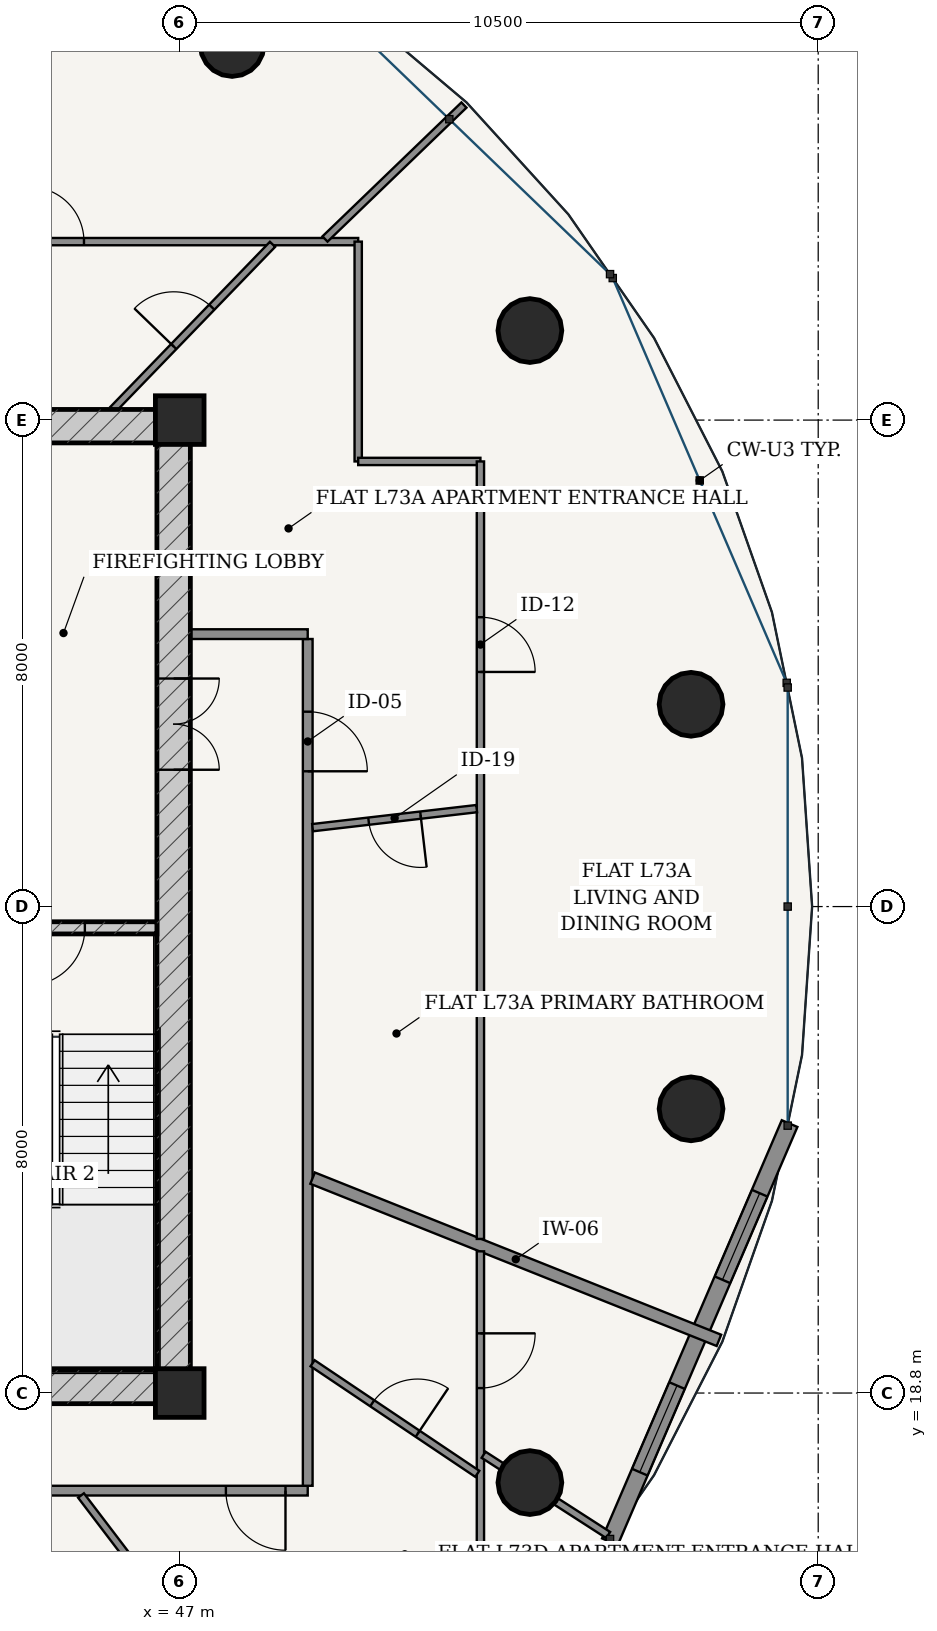
"""IFC4 building model, lengths in metres.
Left out: names, types, materials, properties, quantities, classifications, styles, units other than length and angle.
Written with IfcOpenShell. Run it as: python <this file> out.ifc"""

import sys

from ifc_helpers import new_model, si_unit, direction, frame, frame_2d, origin, origin_2d, place, context, subcontext, project, spatial, rectangle, hollow_circle, extrude, source, transform, mapped, element, fill, save


model = new_model("IFC4")
c1 = context("Model", 3, precision=1e-05, world=origin(), true_north=direction((-0.2419218956, 0.970295726276)))
c2 = subcontext(c1, "Body", "Model", "MODEL_VIEW")
j1 = project(units=[si_unit("LENGTHUNIT", "METRE"), si_unit("PLANEANGLEUNIT", "RADIAN")], contexts=[c1])
p1 = place(None, origin())
s1 = spatial("IfcSite", under=j1, at=p1, CompositionType="ELEMENT")
p2 = place(p1, origin())
s2 = spatial("IfcBuilding", under=s1, at=p2, CompositionType="ELEMENT")
p3 = place(p2, frame((0.0, 0.0, 278.2)))
s3 = spatial("IfcBuildingStorey", under=s2, at=p3, CompositionType="ELEMENT", Elevation=278.2)
for number, where, z_axis, x_axis in (
    (1, (47.0, 18.8, 0.0), (0.0, 0.0, 1.0), (1.0, 0.0, 0.0)),
    (2, (47.0, 34.8, 0.0), (0.0, 0.0, 1.0), (1.0, 0.0, 0.0)),
):
    element("IfcColumn", number, at=place(p3, frame(where, z_axis=z_axis, x_axis=x_axis)), inside=s3, PredefinedType="COLUMN", context=c2, shape_type="SweptSolid", body=[
        extrude(rectangle(XDim=0.8, YDim=0.8, at=origin_2d()), origin(), (0.0, 0.0, 1.0), 3.75),
    ])
p4 = place(p3, frame((28.825, 18.9, 0.0), z_axis=(0.0, 0.0, 1.0), x_axis=(1.0, 0.0, 0.0)))
e3 = element("IfcWall", 3, at=p4, inside=s3, PredefinedType="SHEAR", context=c2, shape_type="SweptSolid", body=[
    extrude(rectangle(XDim=18.35, YDim=0.55, at=frame_2d((9.175, 0.0))), origin(), (0.0, 0.0, 1.0), 3.49),
])
p5 = place(p4, frame((6.71, 0.0, 0.0)))
e4 = element("IfcOpeningElement", 4, at=p5, cuts=e3, PredefinedType="OPENING", context=c2, shape_type="SweptSolid", body=[
    extrude(rectangle(XDim=0.85, YDim=2.1, at=frame_2d((0.425, 1.05))), frame((0.0, 0.285, 0.0), z_axis=(0.0, -1.0, 0.0), x_axis=(1.0, 0.0, 0.0)), (0.0, 0.0, 1.0), 0.57),
])
p6 = place(p4, frame((8.75, 0.0, 0.0)))
e5 = element("IfcOpeningElement", 5, at=p6, cuts=e3, PredefinedType="OPENING", context=c2, shape_type="SweptSolid", body=[
    extrude(rectangle(XDim=0.85, YDim=2.1, at=frame_2d((0.425, 1.05))), frame((0.0, 0.285, 0.0), z_axis=(0.0, -1.0, 0.0), x_axis=(1.0, 0.0, 0.0)), (0.0, 0.0, 1.0), 0.57),
])
p7 = place(p4, frame((10.79, 0.0, 0.0)))
e6 = element("IfcOpeningElement", 6, at=p7, cuts=e3, PredefinedType="OPENING", context=c2, shape_type="SweptSolid", body=[
    extrude(rectangle(XDim=0.85, YDim=2.1, at=frame_2d((0.425, 1.05))), frame((0.0, 0.285, 0.0), z_axis=(0.0, -1.0, 0.0), x_axis=(1.0, 0.0, 0.0)), (0.0, 0.0, 1.0), 0.57),
])
p8 = place(p3, frame((28.825, 34.7, 0.0), z_axis=(0.0, 0.0, 1.0), x_axis=(1.0, 0.0, 0.0)))
e7 = element("IfcWall", 7, at=p8, inside=s3, PredefinedType="SHEAR", context=c2, shape_type="SweptSolid", body=[
    extrude(rectangle(XDim=18.35, YDim=0.55, at=frame_2d((9.175, 0.0))), origin(), (0.0, 0.0, 1.0), 3.49),
])
p9 = place(p3, frame((46.9, 19.175, 0.0), z_axis=(0.0, 0.0, 1.0), x_axis=(0.0, 1.0, 0.0)))
e8 = element("IfcWall", 8, at=p9, inside=s3, PredefinedType="SHEAR", context=c2, shape_type="SweptSolid", body=[
    extrude(rectangle(XDim=15.25, YDim=0.55, at=frame_2d((7.625, 0.0))), origin(), (0.0, 0.0, 1.0), 3.49),
])
p10 = place(p9, frame((9.875, 0.0, 0.0)))
e9 = element("IfcOpeningElement", 9, at=p10, cuts=e8, PredefinedType="OPENING", context=c2, shape_type="SweptSolid", body=[
    extrude(rectangle(XDim=1.5, YDim=2.2, at=frame_2d((0.75, 1.1))), frame((0.0, 0.285, 0.0), z_axis=(0.0, -1.0, 0.0), x_axis=(1.0, 0.0, 0.0)), (0.0, 0.0, 1.0), 0.57),
])
p11 = place(p3, frame((43.305, 26.45, 0.0), z_axis=(0.0, 0.0, 1.0), x_axis=(1.0, 0.0, 0.0)))
e10 = element("IfcWall", 10, at=p11, inside=s3, PredefinedType="SOLIDWALL", context=c2, shape_type="SweptSolid", body=[
    extrude(rectangle(XDim=3.32, YDim=0.2, at=frame_2d((1.66, 0.0))), origin(), (0.0, 0.0, 1.0), 3.49),
])
p12 = place(p11, frame((1.185, 0.0, 0.0)))
e11 = element("IfcOpeningElement", 11, at=p12, cuts=e10, PredefinedType="OPENING", context=c2, shape_type="SweptSolid", body=[
    extrude(rectangle(XDim=0.95, YDim=2.15, at=frame_2d((0.475, 1.075))), frame((0.0, 0.11, 0.0), z_axis=(0.0, -1.0, 0.0), x_axis=(1.0, 0.0, 0.0)), (0.0, 0.0, 1.0), 0.22),
])
for number, where, z_axis, x_axis in (
    (12, (55.409, 30.126, 0.0), (0.0, 0.0, 1.0), (1.0, 0.0, 0.0)),
    (13, (52.759, 36.272, 0.0), (0.0, 0.0, 1.0), (1.0, 0.0, 0.0)),
    (14, (47.861, 40.977, 0.0), (0.0, 0.0, 1.0), (1.0, 0.0, 0.0)),
    (15, (52.759, 17.328, 0.0), (0.0, 0.0, 1.0), (1.0, 0.0, 0.0)),
    (16, (55.409, 23.474, 0.0), (0.0, 0.0, 1.0), (1.0, 0.0, 0.0)),
):
    element("IfcColumn", number, at=place(p3, frame(where, z_axis=z_axis, x_axis=x_axis)), inside=s3, PredefinedType="COLUMN", context=c2, shape_type="SweptSolid", body=[
        extrude(hollow_circle(Radius=0.525, WallThickness=0.035, at=origin_2d()), origin(), (0.0, 0.0, 1.0), 3.75),
    ])
p13 = place(p3, frame((54.074, 16.354, 0.0), z_axis=(0.0, 0.0, 1.0), x_axis=(0.394816612978, 0.918759948037, 0.0)))
e17 = element("IfcWall", 17, at=p13, inside=s3, PredefinedType="SOLIDWALL", context=c2, shape_type="SweptSolid", body=[
    extrude(rectangle(XDim=7.485, YDim=0.28, at=frame_2d((3.743, 0.0))), origin(), (0.0, 0.0, 1.0), 3.49),
])
p14 = place(p13, frame((1.246, 0.0, 0.85)))
e18 = element("IfcOpeningElement", 18, at=p14, cuts=e17, PredefinedType="OPENING", context=c2, shape_type="SweptSolid", body=[
    extrude(rectangle(XDim=1.55, YDim=1.95, at=frame_2d((0.775, 0.975))), frame((0.0, 0.15, 0.0), z_axis=(0.0, -1.0, 0.0), x_axis=(1.0, 0.0, 0.0)), (0.0, 0.0, 1.0), 0.3),
])
p15 = place(p13, frame((4.689, 0.0, 0.85)))
e19 = element("IfcOpeningElement", 19, at=p15, cuts=e17, PredefinedType="OPENING", context=c2, shape_type="SweptSolid", body=[
    extrude(rectangle(XDim=1.55, YDim=1.95, at=frame_2d((0.775, 0.975))), frame((0.0, 0.15, 0.0), z_axis=(0.0, -1.0, 0.0), x_axis=(1.0, 0.0, 0.0)), (0.0, 0.0, 1.0), 0.3),
])
p16 = place(p3, frame((26.895, 17.195, 0.0), z_axis=(0.0, 0.0, 1.0), x_axis=(1.0, 0.0, 0.0)))
e20 = element("IfcWall", 20, at=p16, inside=s3, PredefinedType="PARTITIONING", context=c2, shape_type="SweptSolid", body=[
    extrude(rectangle(XDim=22.21, YDim=0.16, at=frame_2d((11.105, 0.0))), origin(), (0.0, 0.0, 1.0), 3.015),
])
p17 = place(p16, frame((9.746, 0.0, 0.0)))
e21 = element("IfcOpeningElement", 21, at=p17, cuts=e20, PredefinedType="OPENING", context=c2, shape_type="SweptSolid", body=[
    extrude(rectangle(XDim=0.98, YDim=2.2, at=frame_2d((0.49, 1.1))), frame((0.0, 0.09, 0.0), z_axis=(0.0, -1.0, 0.0), x_axis=(1.0, 0.0, 0.0)), (0.0, 0.0, 1.0), 0.18),
])
p18 = place(p16, frame((20.864, 0.0, 0.0)))
e22 = element("IfcOpeningElement", 22, at=p18, cuts=e20, PredefinedType="OPENING", context=c2, shape_type="SweptSolid", body=[
    extrude(rectangle(XDim=0.98, YDim=2.2, at=frame_2d((0.49, 1.1))), frame((0.0, 0.09, 0.0), z_axis=(0.0, -1.0, 0.0), x_axis=(1.0, 0.0, 0.0)), (0.0, 0.0, 1.0), 0.18),
])
p19 = place(p3, frame((49.105, 17.275, 0.0), z_axis=(0.0, 0.0, 1.0), x_axis=(0.0, 1.0, 0.0)))
e23 = element("IfcWall", 23, at=p19, inside=s3, PredefinedType="PARTITIONING", context=c2, shape_type="SweptSolid", body=[
    extrude(rectangle(XDim=13.925, YDim=0.16, at=frame_2d((6.962, 0.0))), origin(), (0.0, 0.0, 1.0), 3.015),
])
p20 = place(p19, frame((11.75, 0.0, 0.0)))
e24 = element("IfcOpeningElement", 24, at=p20, cuts=e23, PredefinedType="OPENING", context=c2, shape_type="SweptSolid", body=[
    extrude(rectangle(XDim=0.98, YDim=2.2, at=frame_2d((0.49, 1.1))), frame((0.0, 0.09, 0.0), z_axis=(0.0, -1.0, 0.0), x_axis=(1.0, 0.0, 0.0)), (0.0, 0.0, 1.0), 0.18),
])
p21 = place(p3, frame((47.175, 31.28, 0.0), z_axis=(0.0, 0.0, 1.0), x_axis=(1.0, 0.0, 0.0)))
e25 = element("IfcWall", 25, at=p21, inside=s3, PredefinedType="PARTITIONING", context=c2, shape_type="SweptSolid", body=[
    extrude(rectangle(XDim=1.93, YDim=0.16, at=frame_2d((0.965, 0.0))), origin(), (0.0, 0.0, 1.0), 3.49),
])
p22 = place(p3, frame((49.185, 22.334, 0.0), z_axis=(0.0, 0.0, 1.0), x_axis=(0.928710518269, -0.370805573389, 0.0)))
e26 = element("IfcWall", 26, at=p22, inside=s3, PredefinedType="PARTITIONING", context=c2, shape_type="SweptSolid", body=[
    extrude(rectangle(XDim=7.195, YDim=0.2, at=frame_2d((3.598, 0.0))), origin(), (0.0, 0.0, 1.0), 3.121),
])
p23 = place(p3, frame((26.065, 37.735, 0.0), z_axis=(0.0, 0.0, 1.0), x_axis=(1.0, 0.0, 0.0)))
e27 = element("IfcWall", 27, at=p23, inside=s3, PredefinedType="PARTITIONING", context=c2, shape_type="SweptSolid", body=[
    extrude(rectangle(XDim=23.87, YDim=0.12, at=frame_2d((11.935, 0.0))), origin(), (0.0, 0.0, 1.0), 3.015),
])
p24 = place(p23, frame((18.46, 0.0, 0.0)))
e28 = element("IfcOpeningElement", 28, at=p24, cuts=e27, PredefinedType="OPENING", context=c2, shape_type="SweptSolid", body=[
    extrude(rectangle(XDim=0.9, YDim=2.15, at=frame_2d((0.45, 1.075))), frame((0.0, 0.07, 0.0), z_axis=(0.0, -1.0, 0.0), x_axis=(1.0, 0.0, 0.0)), (0.0, 0.0, 1.0), 0.14),
])
p25 = place(p23, frame((3.144, 0.0, 0.0)))
e29 = element("IfcOpeningElement", 29, at=p25, cuts=e27, PredefinedType="OPENING", context=c2, shape_type="SweptSolid", body=[
    extrude(rectangle(XDim=0.9, YDim=2.15, at=frame_2d((0.45, 1.075))), frame((0.0, 0.07, 0.0), z_axis=(0.0, -1.0, 0.0), x_axis=(1.0, 0.0, 0.0)), (0.0, 0.0, 1.0), 0.14),
])
p26 = place(p3, frame((49.935, 37.735, 0.0), z_axis=(0.0, 0.0, 1.0), x_axis=(0.0, -1.0, 0.0)))
e30 = element("IfcWall", 30, at=p26, inside=s3, PredefinedType="PARTITIONING", context=c2, shape_type="SweptSolid", body=[
    extrude(rectangle(XDim=3.615, YDim=0.12, at=frame_2d((1.808, 0.0))), origin(), (0.0, 0.0, 1.0), 3.015),
])
p27 = place(p3, frame((49.935, 34.12, 0.0), z_axis=(0.0, 0.0, 1.0), x_axis=(1.0, 0.0, 0.0)))
e31 = element("IfcWall", 31, at=p27, inside=s3, PredefinedType="PARTITIONING", context=c2, shape_type="SweptSolid", body=[
    extrude(rectangle(XDim=2.01, YDim=0.12, at=frame_2d((1.005, 0.0))), origin(), (0.0, 0.0, 1.0), 3.209),
])
p28 = place(p3, frame((51.945, 34.12, 0.0), z_axis=(0.0, 0.0, 1.0), x_axis=(0.0, -1.0, 0.0)))
e32 = element("IfcWall", 32, at=p28, inside=s3, PredefinedType="PARTITIONING", context=c2, shape_type="SweptSolid", body=[
    extrude(rectangle(XDim=12.786, YDim=0.12, at=frame_2d((6.393, 0.0))), origin(), (0.0, 0.0, 1.0), 3.015),
])
p29 = place(p28, frame((2.562, 0.0, 0.0)))
e33 = element("IfcOpeningElement", 33, at=p29, cuts=e32, PredefinedType="OPENING", context=c2, shape_type="SweptSolid", body=[
    extrude(rectangle(XDim=0.9, YDim=2.15, at=frame_2d((0.45, 1.075))), frame((0.0, 0.07, 0.0), z_axis=(0.0, -1.0, 0.0), x_axis=(1.0, 0.0, 0.0)), (0.0, 0.0, 1.0), 0.14),
])
p30 = place(p3, frame((49.389, 37.778, 0.0), z_axis=(0.0, 0.0, 1.0), x_axis=(0.719985652574, 0.693988948102, 0.0)))
e34 = element("IfcWall", 34, at=p30, inside=s3, PredefinedType="PARTITIONING", context=c2, shape_type="SweptSolid", body=[
    extrude(rectangle(XDim=3.174, YDim=0.12, at=frame_2d((1.587, 0.0))), origin(), (0.0, 0.0, 1.0), 3.121),
])
p31 = place(p3, frame((49.185, 28.098, 0.0), z_axis=(0.0, 0.0, 1.0), x_axis=(0.993339475655, 0.115224503057, 0.0)))
e35 = element("IfcWall", 35, at=p31, inside=s3, PredefinedType="PARTITIONING", context=c2, shape_type="SweptSolid", body=[
    extrude(rectangle(XDim=2.716, YDim=0.12, at=frame_2d((1.358, 0.0))), origin(), (0.0, 0.0, 1.0), 3.209),
])
p32 = place(p31, frame((0.928, 0.0, 0.0)))
e36 = element("IfcOpeningElement", 36, at=p32, cuts=e35, PredefinedType="OPENING", context=c2, shape_type="SweptSolid", body=[
    extrude(rectangle(XDim=0.86, YDim=2.15, at=frame_2d((0.43, 1.075))), frame((0.0, 0.07, 0.0), z_axis=(0.0, -1.0, 0.0), x_axis=(1.0, 0.0, 0.0)), (0.0, 0.0, 1.0), 0.14),
])
p33 = place(p3, frame((45.903, 34.976, 0.0), z_axis=(0.0, 0.0, 1.0), x_axis=(0.69497417129, 0.719034700999, 0.0)))
e37 = element("IfcWall", 37, at=p33, inside=s3, PredefinedType="PARTITIONING", context=c2, shape_type="SweptSolid", body=[
    extrude(rectangle(XDim=3.775, YDim=0.12, at=frame_2d((1.887, 0.0))), origin(), (0.0, 0.0, 1.0), 3.015),
])
p34 = place(p33, frame((1.437, 0.0, 0.0)))
e38 = element("IfcOpeningElement", 38, at=p34, cuts=e37, PredefinedType="OPENING", context=c2, shape_type="SweptSolid", body=[
    extrude(rectangle(XDim=0.9, YDim=2.15, at=frame_2d((0.45, 1.075))), frame((0.0, 0.07, 0.0), z_axis=(0.0, -1.0, 0.0), x_axis=(1.0, 0.0, 0.0)), (0.0, 0.0, 1.0), 0.14),
])
p35 = place(p3, frame((42.162, 17.115, 0.0), z_axis=(0.0, 0.0, 1.0), x_axis=(0.394795631127, -0.918768964236, 0.0)))
e39 = element("IfcWall", 39, at=p35, inside=s3, PredefinedType="PARTITIONING", context=c2, shape_type="SweptSolid", body=[
    extrude(rectangle(XDim=8.202, YDim=0.2, at=frame_2d((4.101, 0.0))), origin(), (0.0, 0.0, 1.0), 3.121),
])
p36 = place(p3, frame((51.945, 21.13, 0.0), z_axis=(0.0, 0.0, 1.0), x_axis=(0.0, -1.0, 0.0)))
e40 = element("IfcWall", 40, at=p36, inside=s3, PredefinedType="PARTITIONING", context=c2, shape_type="SweptSolid", body=[
    extrude(rectangle(XDim=6.775, YDim=0.12, at=frame_2d((3.388, 0.0))), origin(), (0.0, 0.0, 1.0), 3.015),
])
p37 = place(p36, frame((1.349, 0.0, 0.0)))
e41 = element("IfcOpeningElement", 41, at=p37, cuts=e40, PredefinedType="OPENING", context=c2, shape_type="SweptSolid", body=[
    extrude(rectangle(XDim=0.9, YDim=2.15, at=frame_2d((0.45, 1.075))), frame((0.0, 0.07, 0.0), z_axis=(0.0, -1.0, 0.0), x_axis=(1.0, 0.0, 0.0)), (0.0, 0.0, 1.0), 0.14),
])
p38 = place(p3, frame((51.997, 17.785, 0.0), z_axis=(0.0, 0.0, 1.0), x_axis=(0.840715962824, -0.541476379774, 0.0)))
e42 = element("IfcWall", 42, at=p38, inside=s3, PredefinedType="PARTITIONING", context=c2, shape_type="SweptSolid", body=[
    extrude(rectangle(XDim=2.437, YDim=0.12, at=frame_2d((1.219, 0.0))), origin(), (0.0, 0.0, 1.0), 3.015),
])
p39 = place(p3, frame((45.377, 17.115, 0.0), z_axis=(0.0, 0.0, 1.0), x_axis=(0.60588776962, -0.795550130806, 0.0)))
e43 = element("IfcWall", 43, at=p39, inside=s3, PredefinedType="PARTITIONING", context=c2, shape_type="SweptSolid", body=[
    extrude(rectangle(XDim=3.407, YDim=0.12, at=frame_2d((1.704, 0.0))), origin(), (0.0, 0.0, 1.0), 3.209),
])
p40 = place(p39, frame((1.274, 0.0, 0.0)))
e44 = element("IfcOpeningElement", 44, at=p40, cuts=e43, PredefinedType="OPENING", context=c2, shape_type="SweptSolid", body=[
    extrude(rectangle(XDim=0.86, YDim=2.15, at=frame_2d((0.43, 1.075))), frame((0.0, 0.07, 0.0), z_axis=(0.0, -1.0, 0.0), x_axis=(1.0, 0.0, 0.0)), (0.0, 0.0, 1.0), 0.14),
])
p41 = place(p3, frame((49.185, 19.29, 0.0), z_axis=(0.0, 0.0, 1.0), x_axis=(0.830215193761, -0.557443030316, 0.0)))
e45 = element("IfcWall", 45, at=p41, inside=s3, PredefinedType="PARTITIONING", context=c2, shape_type="SweptSolid", body=[
    extrude(rectangle(XDim=3.262, YDim=0.12, at=frame_2d((1.631, 0.0))), origin(), (0.0, 0.0, 1.0), 3.209),
])
p42 = place(p41, frame((1.181, 0.0, 0.0)))
e46 = element("IfcOpeningElement", 46, at=p42, cuts=e45, PredefinedType="OPENING", context=c2, shape_type="SweptSolid", body=[
    extrude(rectangle(XDim=0.9, YDim=2.15, at=frame_2d((0.45, 1.075))), frame((0.0, 0.07, 0.0), z_axis=(0.0, -1.0, 0.0), x_axis=(1.0, 0.0, 0.0)), (0.0, 0.0, 1.0), 0.14),
])
m1 = source(origin(), c2, "Body", "SweptSolid", [
    extrude(rectangle(XDim=1.55, YDim=1.95, at=frame_2d((0.775, 0.975))), frame((0.0, 0.03, 0.0), z_axis=(0.0, -1.0, 0.0), x_axis=(1.0, 0.0, 0.0)), (0.0, 0.0, 1.0), 0.06),
])
p43 = place(p14, origin())
e47 = element("IfcWindow", 47, at=p43, inside=s3, PartitioningType="SINGLE_PANEL", PredefinedType="WINDOW", context=c2, shape_type="MappedRepresentation", body=[
    mapped(m1, transform((0.0, 0.0, 0.0), scale=1.0)),
])
fill(e18, e47)
p44 = place(p15, origin())
e48 = element("IfcWindow", 48, at=p44, inside=s3, PartitioningType="SINGLE_PANEL", PredefinedType="WINDOW", context=c2, shape_type="MappedRepresentation", body=[
    mapped(m1, transform((0.0, 0.0, 0.0), scale=1.0)),
])
fill(e19, e48)
m2 = source(origin(), c2, "Body", "SweptSolid", [
    extrude(rectangle(XDim=1.5, YDim=2.2, at=frame_2d((0.75, 1.1))), frame((0.0, 0.025, 0.0), z_axis=(0.0, -1.0, 0.0), x_axis=(1.0, 0.0, 0.0)), (0.0, 0.0, 1.0), 0.05),
])
p45 = place(p10, frame((1.5, 0.0, 0.0), z_axis=(0.0, 0.0, 1.0), x_axis=(-1.0, 0.0, 0.0)))
e49 = element("IfcDoor", 49, at=p45, inside=s3, OperationType="DOUBLE_DOOR_SINGLE_SWING", PredefinedType="DOOR", context=c2, shape_type="MappedRepresentation", body=[
    mapped(m2, transform((0.0, 0.0, 0.0), scale=1.0)),
])
fill(e9, e49)
m3 = source(origin(), c2, "Body", "SweptSolid", [
    extrude(rectangle(XDim=0.95, YDim=2.15, at=frame_2d((0.475, 1.075))), frame((0.0, 0.025, 0.0), z_axis=(0.0, -1.0, 0.0), x_axis=(1.0, 0.0, 0.0)), (0.0, 0.0, 1.0), 0.05),
])
p46 = place(p12, frame((0.95, 0.0, 0.0), z_axis=(0.0, 0.0, 1.0), x_axis=(-1.0, 0.0, 0.0)))
e50 = element("IfcDoor", 50, at=p46, inside=s3, OperationType="SINGLE_SWING_RIGHT", PredefinedType="DOOR", context=c2, shape_type="MappedRepresentation", body=[
    mapped(m3, transform((0.0, 0.0, 0.0), scale=1.0)),
])
fill(e11, e50)
m4 = source(origin(), c2, "Body", "SweptSolid", [
    extrude(rectangle(XDim=0.98, YDim=2.2, at=frame_2d((0.49, 1.1))), frame((0.0, 0.025, 0.0), z_axis=(0.0, -1.0, 0.0), x_axis=(1.0, 0.0, 0.0)), (0.0, 0.0, 1.0), 0.05),
])
p47 = place(p20, frame((0.98, 0.0, 0.0), z_axis=(0.0, 0.0, 1.0), x_axis=(-1.0, 0.0, 0.0)))
e51 = element("IfcDoor", 51, at=p47, inside=s3, OperationType="SINGLE_SWING_RIGHT", PredefinedType="DOOR", context=c2, shape_type="MappedRepresentation", body=[
    mapped(m4, transform((0.0, 0.0, 0.0), scale=1.0)),
])
fill(e24, e51)
m5 = source(origin(), c2, "Body", "SweptSolid", [
    extrude(rectangle(XDim=0.86, YDim=2.15, at=frame_2d((0.43, 1.075))), frame((0.0, 0.025, 0.0), z_axis=(0.0, -1.0, 0.0), x_axis=(1.0, 0.0, 0.0)), (0.0, 0.0, 1.0), 0.05),
])
p48 = place(p32, frame((0.86, 0.0, 0.0), z_axis=(0.0, 0.0, 1.0), x_axis=(-1.0, 0.0, 0.0)))
e52 = element("IfcDoor", 52, at=p48, inside=s3, OperationType="SINGLE_SWING_LEFT", PredefinedType="DOOR", context=c2, shape_type="MappedRepresentation", body=[
    mapped(m5, transform((0.0, 0.0, 0.0), scale=1.0)),
])
fill(e36, e52)
m6 = source(origin(), c2, "Body", "SweptSolid", [
    extrude(rectangle(XDim=0.9, YDim=2.15, at=frame_2d((0.45, 1.075))), frame((0.0, 0.025, 0.0), z_axis=(0.0, -1.0, 0.0), x_axis=(1.0, 0.0, 0.0)), (0.0, 0.0, 1.0), 0.05),
])
p49 = place(p29, origin())
e53 = element("IfcDoor", 53, at=p49, inside=s3, OperationType="SINGLE_SWING_RIGHT", PredefinedType="DOOR", context=c2, shape_type="MappedRepresentation", body=[
    mapped(m6, transform((0.0, 0.0, 0.0), scale=1.0)),
])
fill(e33, e53)
p50 = place(p34, origin())
e54 = element("IfcDoor", 54, at=p50, inside=s3, OperationType="SINGLE_SWING_LEFT", PredefinedType="DOOR", context=c2, shape_type="MappedRepresentation", body=[
    mapped(m6, transform((0.0, 0.0, 0.0), scale=1.0)),
])
fill(e38, e54)
p51 = place(p24, origin())
e55 = element("IfcDoor", 55, at=p51, inside=s3, OperationType="SINGLE_SWING_LEFT", PredefinedType="DOOR", context=c2, shape_type="MappedRepresentation", body=[
    mapped(m6, transform((0.0, 0.0, 0.0), scale=1.0)),
])
fill(e28, e55)
p52 = place(p18, frame((0.98, 0.0, 0.0), z_axis=(0.0, 0.0, 1.0), x_axis=(-1.0, 0.0, 0.0)))
e56 = element("IfcDoor", 56, at=p52, inside=s3, OperationType="SINGLE_SWING_LEFT", PredefinedType="DOOR", context=c2, shape_type="MappedRepresentation", body=[
    mapped(m4, transform((0.0, 0.0, 0.0), scale=1.0)),
])
fill(e22, e56)
p53 = place(p42, origin())
e57 = element("IfcDoor", 57, at=p53, inside=s3, OperationType="SINGLE_SWING_RIGHT", PredefinedType="DOOR", context=c2, shape_type="MappedRepresentation", body=[
    mapped(m6, transform((0.0, 0.0, 0.0), scale=1.0)),
])
fill(e46, e57)
p54 = place(p37, origin())
e58 = element("IfcDoor", 58, at=p54, inside=s3, OperationType="SINGLE_SWING_LEFT", PredefinedType="DOOR", context=c2, shape_type="MappedRepresentation", body=[
    mapped(m6, transform((0.0, 0.0, 0.0), scale=1.0)),
])
fill(e41, e58)
save(model, sys.argv[1])
